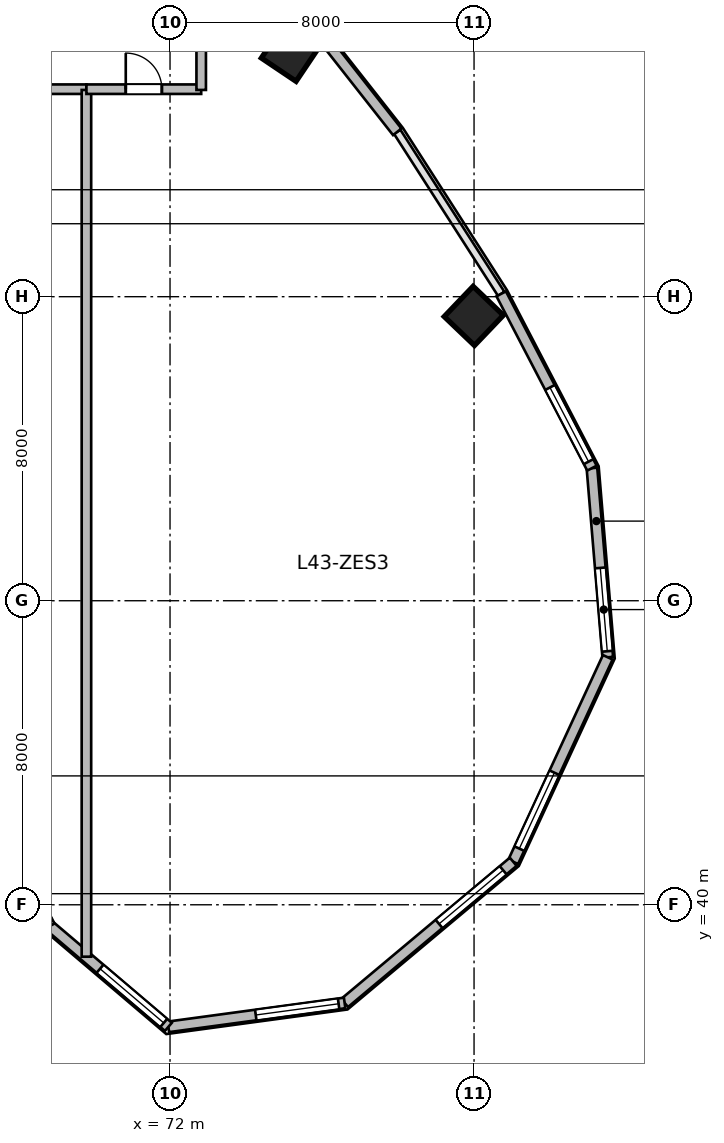
"""IFC4 building model, lengths in metres.
Left out: names, types, materials, properties, quantities, classifications, styles, units other than length and angle.
Written with IfcOpenShell. Run it as: python <this file> out.ifc"""

import sys

from ifc_helpers import new_model, si_unit, direction, frame, frame_2d, origin, origin_2d, place, context, subcontext, project, spatial, rectangle, extrude, source, transform, mapped, element, fill, save


model = new_model("IFC4")
c1 = context("Model", 3, precision=1e-05, world=origin(), true_north=direction((0.0, 1.0)))
c2 = subcontext(c1, "Body", "Model", "MODEL_VIEW")
j1 = project(units=[si_unit("LENGTHUNIT", "METRE"), si_unit("PLANEANGLEUNIT", "RADIAN")], contexts=[c1])
p1 = place(None, origin())
s1 = spatial("IfcSite", under=j1, at=p1, CompositionType="ELEMENT")
p2 = place(p1, origin())
s2 = spatial("IfcBuilding", under=s1, at=p2, CompositionType="ELEMENT")
p3 = place(p2, frame((0.0, 0.0, 177.9)))
s3 = spatial("IfcBuildingStorey", under=s2, at=p3, CompositionType="ELEMENT", Elevation=177.9)
m1 = source(origin(), c2, "Body", "SweptSolid", [
    extrude(rectangle(XDim=1.1, YDim=1.1, at=origin_2d()), origin(), (0.0, 0.0, 1.0), 3.9),
])
for number, where, z_axis, x_axis in (
    (1, (75.167, 62.43, 0.0), (0.0, 0.0, 1.0), (0.558, 0.83, 0.0)),
    (2, (79.993, 55.494, 0.0), (0.0, 0.0, 1.0), (0.691, 0.723, 0.0)),
):
    element("IfcColumn", number, at=place(p3, frame(where, z_axis=z_axis, x_axis=x_axis)), inside=s3, PredefinedType="COLUMN", context=c2, shape_type="MappedRepresentation", body=[
        mapped(m1, transform((0.0, 0.0, 0.0), scale=1.0)),
    ])
m2 = source(origin(), c2, "Body", "SweptSolid", [
    extrude(rectangle(XDim=4.994, YDim=0.28, at=frame_2d((2.497, 0.0))), origin(), (0.0, 0.0, 1.0), 3.65),
])
p4 = place(p3, frame((83.102, 51.489, 0.0), z_axis=(0.0, 0.0, 1.0), x_axis=(0.083344839916, -0.996520766296, 0.0)))
e3 = element("IfcWall", 3, at=p4, inside=s3, PredefinedType="SOLIDWALL", context=c2, shape_type="MappedRepresentation", body=[
    mapped(m2, transform((0.0, 0.0, 0.0), scale=1.0)),
])
p5 = place(p4, frame((2.635, 0.0, 0.95)))
e4 = element("IfcOpeningElement", 4, at=p5, cuts=e3, PredefinedType="OPENING", context=c2, shape_type="SweptSolid", body=[
    extrude(rectangle(XDim=2.2, YDim=2.1, at=frame_2d((1.1, 1.05))), frame((0.0, 0.15, 0.0), z_axis=(0.0, -1.0, 0.0), x_axis=(1.0, 0.0, 0.0)), (0.0, 0.0, 1.0), 0.3),
])
m3 = source(origin(), c2, "Body", "SweptSolid", [
    extrude(rectangle(XDim=5.927, YDim=0.28, at=frame_2d((2.964, 0.0))), origin(), (0.0, 0.0, 1.0), 3.65),
])
p6 = place(p3, frame((83.519, 46.512, 0.0), z_axis=(0.0, 0.0, 1.0), x_axis=(-0.419656204795, -0.907683132914, 0.0)))
e5 = element("IfcWall", 5, at=p6, inside=s3, PredefinedType="SOLIDWALL", context=c2, shape_type="MappedRepresentation", body=[
    mapped(m3, transform((0.0, 0.0, 0.0), scale=1.0)),
])
p7 = place(p6, frame((3.346, 0.0, 0.95)))
e6 = element("IfcOpeningElement", 6, at=p7, cuts=e5, PredefinedType="OPENING", context=c2, shape_type="SweptSolid", body=[
    extrude(rectangle(XDim=2.2, YDim=2.1, at=frame_2d((1.1, 1.05))), frame((0.0, 0.15, 0.0), z_axis=(0.0, -1.0, 0.0), x_axis=(1.0, 0.0, 0.0)), (0.0, 0.0, 1.0), 0.3),
])
m4 = source(origin(), c2, "Body", "SweptSolid", [
    extrude(rectangle(XDim=5.786, YDim=0.28, at=frame_2d((2.893, 0.0))), origin(), (0.0, 0.0, 1.0), 3.65),
])
p8 = place(p3, frame((81.031, 41.131, 0.0), z_axis=(0.0, 0.0, 1.0), x_axis=(-0.766711306852, -0.641992034176, 0.0)))
e7 = element("IfcWall", 7, at=p8, inside=s3, PredefinedType="SOLIDWALL", context=c2, shape_type="MappedRepresentation", body=[
    mapped(m4, transform((0.0, 0.0, 0.0), scale=1.0)),
])
p9 = place(p8, frame((0.347, 0.0, 0.95)))
e8 = element("IfcOpeningElement", 8, at=p9, cuts=e7, PredefinedType="OPENING", context=c2, shape_type="SweptSolid", body=[
    extrude(rectangle(XDim=2.2, YDim=2.1, at=frame_2d((1.1, 1.05))), frame((0.0, 0.15, 0.0), z_axis=(0.0, -1.0, 0.0), x_axis=(1.0, 0.0, 0.0)), (0.0, 0.0, 1.0), 0.3),
])
m5 = source(origin(), c2, "Body", "SweptSolid", [
    extrude(rectangle(XDim=4.68, YDim=0.28, at=frame_2d((2.34, 0.0))), origin(), (0.0, 0.0, 1.0), 3.65),
])
p10 = place(p3, frame((76.594, 37.417, 0.0), z_axis=(0.0, 0.0, 1.0), x_axis=(-0.990931146435, -0.134370618162, 0.0)))
e9 = element("IfcWall", 9, at=p10, inside=s3, PredefinedType="SOLIDWALL", context=c2, shape_type="MappedRepresentation", body=[
    mapped(m5, transform((0.0, 0.0, 0.0), scale=1.0)),
])
p11 = place(p10, frame((0.16, 0.0, 0.95)))
e10 = element("IfcOpeningElement", 10, at=p11, cuts=e9, PredefinedType="OPENING", context=c2, shape_type="SweptSolid", body=[
    extrude(rectangle(XDim=2.2, YDim=2.1, at=frame_2d((1.1, 1.05))), frame((0.0, 0.15, 0.0), z_axis=(0.0, -1.0, 0.0), x_axis=(1.0, 0.0, 0.0)), (0.0, 0.0, 1.0), 0.3),
])
m6 = source(origin(), c2, "Body", "SweptSolid", [
    extrude(rectangle(XDim=4.096, YDim=0.28, at=frame_2d((2.048, 0.0))), origin(), (0.0, 0.0, 1.0), 3.65),
])
p12 = place(p3, frame((71.957, 36.788, 0.0), z_axis=(0.0, 0.0, 1.0), x_axis=(-0.761926081737, 0.647663991564, 0.0)))
e11 = element("IfcWall", 11, at=p12, inside=s3, PredefinedType="SOLIDWALL", context=c2, shape_type="MappedRepresentation", body=[
    mapped(m6, transform((0.0, 0.0, 0.0), scale=1.0)),
])
p13 = place(p12, frame((0.16, 0.0, 0.95)))
e12 = element("IfcOpeningElement", 12, at=p13, cuts=e11, PredefinedType="OPENING", context=c2, shape_type="SweptSolid", body=[
    extrude(rectangle(XDim=2.2, YDim=2.1, at=frame_2d((1.1, 1.05))), frame((0.0, 0.15, 0.0), z_axis=(0.0, -1.0, 0.0), x_axis=(1.0, 0.0, 0.0)), (0.0, 0.0, 1.0), 0.3),
])
m7 = source(origin(), c2, "Body", "SweptSolid", [
    extrude(rectangle(XDim=3.024, YDim=0.28, at=frame_2d((1.512, 0.0))), origin(), (0.0, 0.0, 1.0), 3.65),
])
p14 = place(p3, frame((68.836, 39.44, 0.0), z_axis=(0.0, 0.0, 1.0), x_axis=(-0.461718746531, 0.887026380161, 0.0)))
e13 = element("IfcWall", 13, at=p14, inside=s3, PredefinedType="SOLIDWALL", context=c2, shape_type="MappedRepresentation", body=[
    mapped(m7, transform((0.0, 0.0, 0.0), scale=1.0)),
])
p15 = place(p14, frame((0.16, 0.0, 0.95)))
e14 = element("IfcOpeningElement", 14, at=p15, cuts=e13, PredefinedType="OPENING", context=c2, shape_type="SweptSolid", body=[
    extrude(rectangle(XDim=1.6, YDim=1.9, at=frame_2d((0.8, 0.95))), frame((0.0, 0.15, 0.0), z_axis=(0.0, -1.0, 0.0), x_axis=(1.0, 0.0, 0.0)), (0.0, 0.0, 1.0), 0.3),
])
m8 = source(origin(), c2, "Body", "SweptSolid", [
    extrude(rectangle(XDim=4.922, YDim=0.28, at=frame_2d((2.461, 0.0))), origin(), (0.0, 0.0, 1.0), 3.65),
])
p16 = place(p3, frame((74.936, 64.206, 0.0), z_axis=(0.0, 0.0, 1.0), x_axis=(0.61817639101, -0.786039407153, 0.0)))
e15 = element("IfcWall", 15, at=p16, inside=s3, PredefinedType="SOLIDWALL", context=c2, shape_type="MappedRepresentation", body=[
    mapped(m8, transform((0.0, 0.0, 0.0), scale=1.0)),
])
m9 = source(origin(), c2, "Body", "SweptSolid", [
    extrude(rectangle(XDim=5.171, YDim=0.28, at=frame_2d((2.585, 0.0))), origin(), (0.0, 0.0, 1.0), 3.65),
])
p17 = place(p3, frame((80.715, 56.075, 0.0), z_axis=(0.0, 0.0, 1.0), x_axis=(0.461752581363, -0.887008767491, 0.0)))
e16 = element("IfcWall", 16, at=p17, inside=s3, PredefinedType="SOLIDWALL", context=c2, shape_type="MappedRepresentation", body=[
    mapped(m9, transform((0.0, 0.0, 0.0), scale=1.0)),
])
p18 = place(p17, frame((2.778, 0.0, 0.95)))
e17 = element("IfcOpeningElement", 17, at=p18, cuts=e16, PredefinedType="OPENING", context=c2, shape_type="SweptSolid", body=[
    extrude(rectangle(XDim=2.2, YDim=2.1, at=frame_2d((1.1, 1.05))), frame((0.0, 0.15, 0.0), z_axis=(0.0, -1.0, 0.0), x_axis=(1.0, 0.0, 0.0)), (0.0, 0.0, 1.0), 0.3),
])
m10 = source(origin(), c2, "Body", "SweptSolid", [
    extrude(rectangle(XDim=4.3, YDim=0.25, at=frame_2d((2.15, 0.0))), origin(), (0.0, 0.0, 1.0), 3.65),
])
p19 = place(p3, frame((65.5, 61.46, 0.0), z_axis=(0.0, 0.0, 1.0), x_axis=(1.0, 0.0, 0.0)))
e18 = element("IfcWall", 18, at=p19, inside=s3, PredefinedType="PARTITIONING", context=c2, shape_type="MappedRepresentation", body=[
    mapped(m10, transform((0.0, 0.0, 0.0), scale=1.0)),
])
p20 = place(p19, frame((1.675, 0.0, 0.0)))
e19 = element("IfcOpeningElement", 19, at=p20, cuts=e18, PredefinedType="OPENING", context=c2, shape_type="SweptSolid", body=[
    extrude(rectangle(XDim=0.95, YDim=2.1, at=frame_2d((0.475, 1.05))), frame((0.0, 0.135, 0.0), z_axis=(0.0, -1.0, 0.0), x_axis=(1.0, 0.0, 0.0)), (0.0, 0.0, 1.0), 0.27),
])
m11 = source(origin(), c2, "Body", "SweptSolid", [
    extrude(rectangle(XDim=22.806, YDim=0.25, at=frame_2d((11.403, 0.0))), origin(), (0.0, 0.0, 1.0), 2.942),
])
p21 = place(p3, frame((69.8, 38.634, 0.0), z_axis=(0.0, 0.0, 1.0), x_axis=(0.0, 1.0, 0.0)))
e20 = element("IfcWall", 20, at=p21, inside=s3, PredefinedType="PARTITIONING", context=c2, shape_type="MappedRepresentation", body=[
    mapped(m11, transform((0.0, 0.0, 0.0), scale=1.0)),
])
m12 = source(origin(), c2, "Body", "SweptSolid", [
    extrude(rectangle(XDim=3.02, YDim=0.25, at=frame_2d((1.51, 0.0))), origin(), (0.0, 0.0, 1.0), 3.65),
])
p22 = place(p3, frame((69.8, 61.46, 0.0), z_axis=(0.0, 0.0, 1.0), x_axis=(1.0, 0.0, 0.0)))
e21 = element("IfcWall", 21, at=p22, inside=s3, PredefinedType="PARTITIONING", context=c2, shape_type="MappedRepresentation", body=[
    mapped(m12, transform((0.0, 0.0, 0.0), scale=1.0)),
])
p23 = place(p22, frame((1.035, 0.0, 0.0)))
e22 = element("IfcOpeningElement", 22, at=p23, cuts=e21, PredefinedType="OPENING", context=c2, shape_type="SweptSolid", body=[
    extrude(rectangle(XDim=0.95, YDim=2.1, at=frame_2d((0.475, 1.05))), frame((0.0, 0.135, 0.0), z_axis=(0.0, -1.0, 0.0), x_axis=(1.0, 0.0, 0.0)), (0.0, 0.0, 1.0), 0.27),
])
m13 = source(origin(), c2, "Body", "SweptSolid", [
    extrude(rectangle(XDim=2.62, YDim=0.25, at=frame_2d((1.31, 0.0))), origin(), (0.0, 0.0, 1.0), 3.093),
])
p24 = place(p3, frame((72.82, 61.44, 0.0), z_axis=(0.0, 0.0, 1.0), x_axis=(0.0, 1.0, 0.0)))
e23 = element("IfcWall", 23, at=p24, inside=s3, PredefinedType="PARTITIONING", context=c2, shape_type="MappedRepresentation", body=[
    mapped(m13, transform((0.0, 0.0, 0.0), scale=1.0)),
])
m14 = source(origin(), c2, "Body", "SweptSolid", [
    extrude(rectangle(XDim=2.2, YDim=2.1, at=frame_2d((1.1, 1.05))), frame((0.0, 0.03, 0.0), z_axis=(0.0, -1.0, 0.0), x_axis=(1.0, 0.0, 0.0)), (0.0, 0.0, 1.0), 0.06),
])
p25 = place(p5, origin())
e24 = element("IfcWindow", 24, at=p25, inside=s3, PartitioningType="TRIPLE_PANEL_VERTICAL", PredefinedType="WINDOW", context=c2, shape_type="MappedRepresentation", body=[
    mapped(m14, transform((0.0, 0.0, 0.0), scale=1.0)),
])
fill(e4, e24)
p26 = place(p7, origin())
e25 = element("IfcWindow", 25, at=p26, inside=s3, PartitioningType="TRIPLE_PANEL_VERTICAL", PredefinedType="WINDOW", context=c2, shape_type="MappedRepresentation", body=[
    mapped(m14, transform((0.0, 0.0, 0.0), scale=1.0)),
])
fill(e6, e25)
p27 = place(p9, origin())
e26 = element("IfcWindow", 26, at=p27, inside=s3, PartitioningType="TRIPLE_PANEL_VERTICAL", PredefinedType="WINDOW", context=c2, shape_type="MappedRepresentation", body=[
    mapped(m14, transform((0.0, 0.0, 0.0), scale=1.0)),
])
fill(e8, e26)
p28 = place(p11, origin())
e27 = element("IfcWindow", 27, at=p28, inside=s3, PartitioningType="TRIPLE_PANEL_VERTICAL", PredefinedType="WINDOW", context=c2, shape_type="MappedRepresentation", body=[
    mapped(m14, transform((0.0, 0.0, 0.0), scale=1.0)),
])
fill(e10, e27)
p29 = place(p13, origin())
e28 = element("IfcWindow", 28, at=p29, inside=s3, PartitioningType="TRIPLE_PANEL_VERTICAL", PredefinedType="WINDOW", context=c2, shape_type="MappedRepresentation", body=[
    mapped(m14, transform((0.0, 0.0, 0.0), scale=1.0)),
])
fill(e12, e28)
p30 = place(p18, origin())
e29 = element("IfcWindow", 29, at=p30, inside=s3, PartitioningType="TRIPLE_PANEL_VERTICAL", PredefinedType="WINDOW", context=c2, shape_type="MappedRepresentation", body=[
    mapped(m14, transform((0.0, 0.0, 0.0), scale=1.0)),
])
fill(e17, e29)
m15 = source(origin(), c2, "Body", "SweptSolid", [
    extrude(rectangle(XDim=0.95, YDim=2.1, at=frame_2d((0.475, 1.05))), frame((0.0, 0.025, 0.0), z_axis=(0.0, -1.0, 0.0), x_axis=(1.0, 0.0, 0.0)), (0.0, 0.0, 1.0), 0.05),
])
p31 = place(p23, origin())
e30 = element("IfcDoor", 30, at=p31, inside=s3, OperationType="SINGLE_SWING_LEFT", PredefinedType="DOOR", context=c2, shape_type="MappedRepresentation", body=[
    mapped(m15, transform((0.0, 0.0, 0.0), scale=1.0)),
])
fill(e22, e30)
save(model, sys.argv[1])
